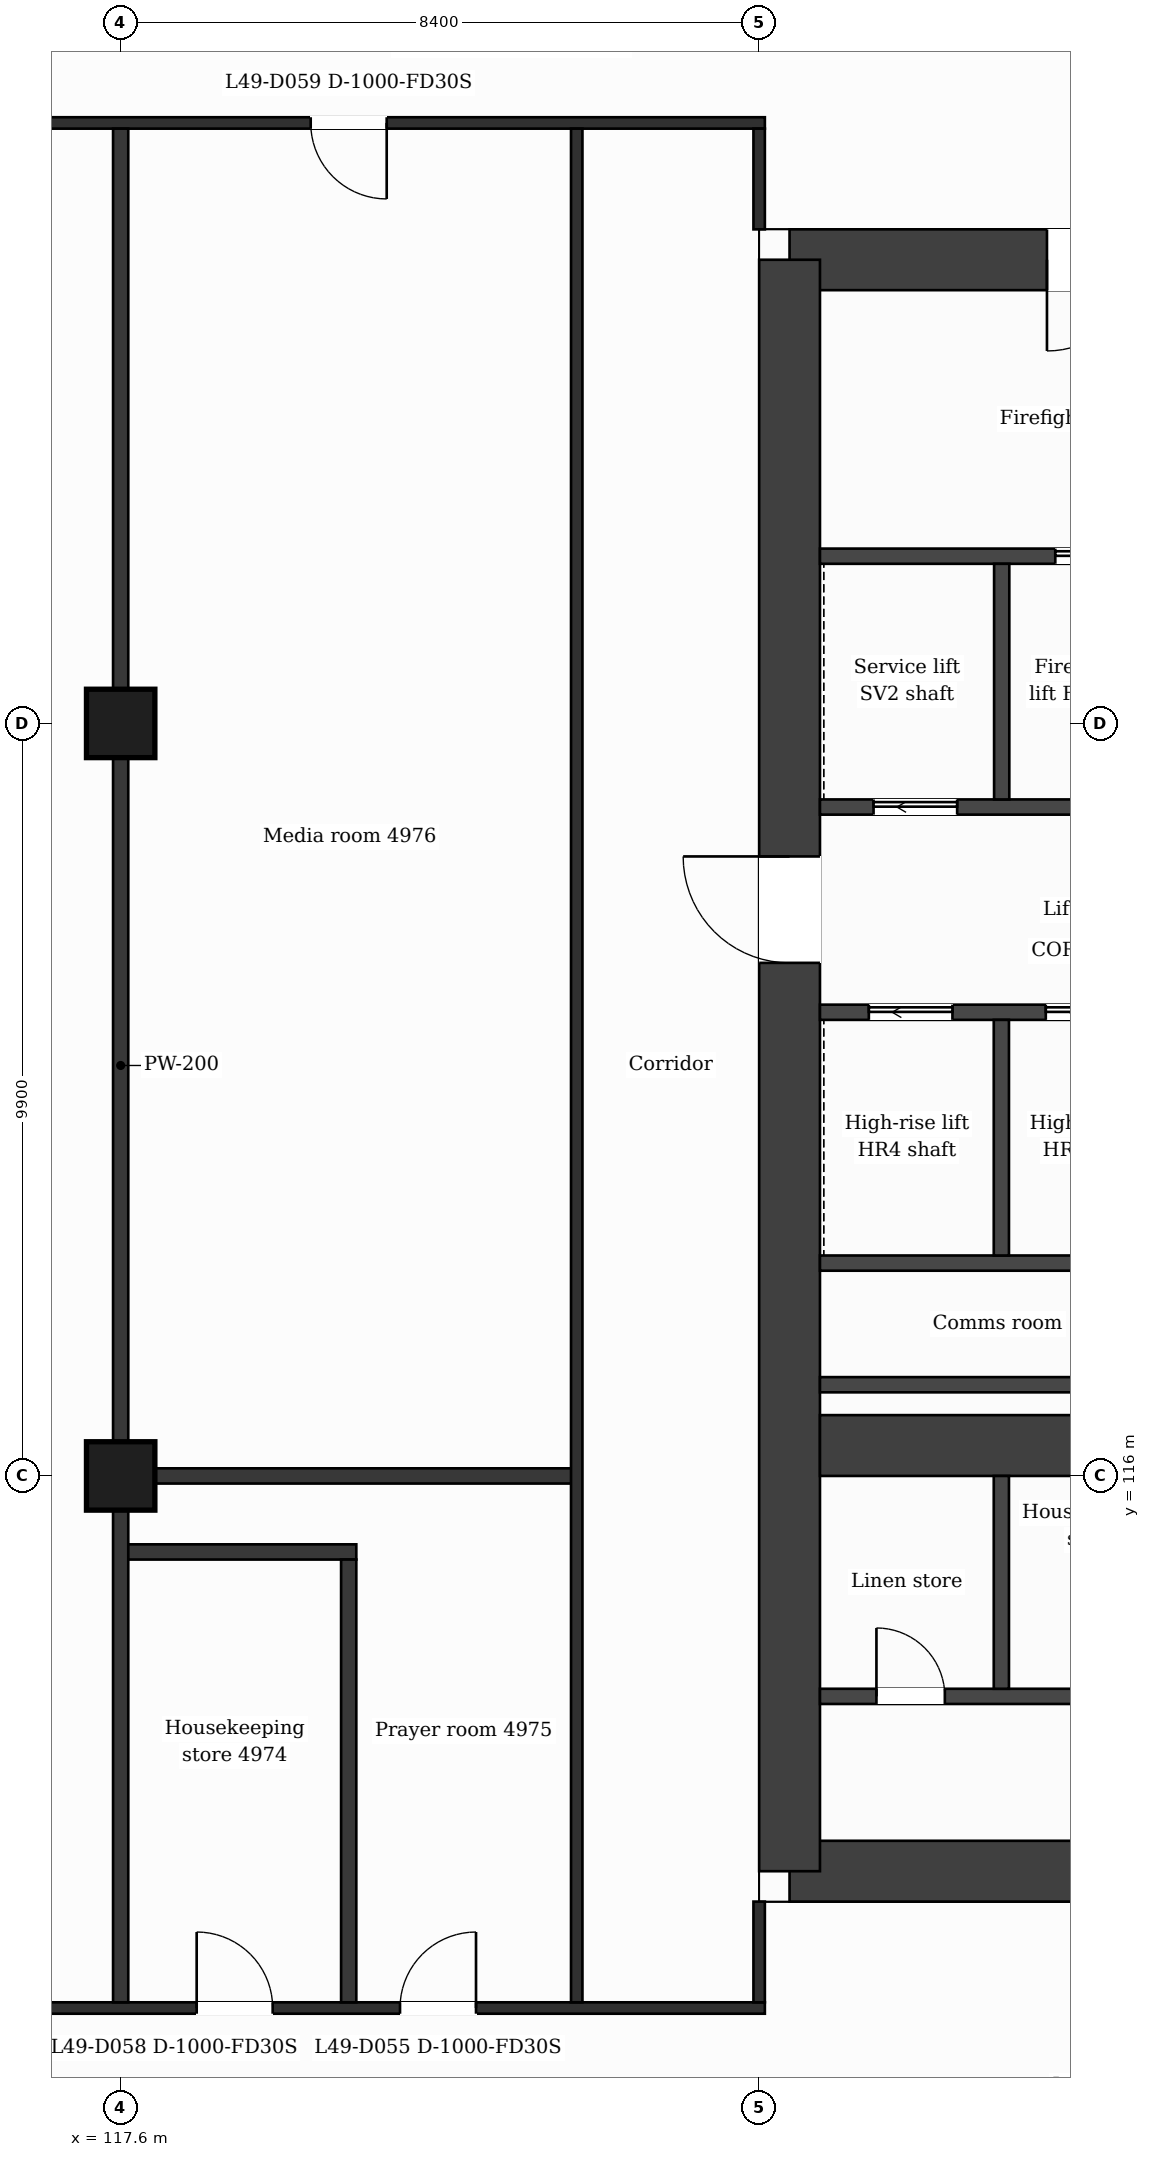
"""IFC4 building model, lengths in metres.
Left out: names, types, materials, properties, quantities, classifications, styles, units other than length and angle.
Written with IfcOpenShell. Run it as: python <this file> out.ifc"""

import sys

from ifc_helpers import new_model, si_unit, direction, frame, frame_2d, origin, origin_2d, place, context, subcontext, project, spatial, rectangle, extrude, element, fill, save


model = new_model("IFC4")
c1 = context("Model", 3, precision=1e-05, world=origin(), true_north=direction((0.0, 1.0)))
c2 = subcontext(c1, "Body", "Model", "MODEL_VIEW")
j1 = project(units=[si_unit("LENGTHUNIT", "METRE"), si_unit("PLANEANGLEUNIT", "RADIAN")], contexts=[c1])
p1 = place(None, origin())
s1 = spatial("IfcSite", under=j1, at=p1, CompositionType="ELEMENT")
p2 = place(p1, origin())
s2 = spatial("IfcBuilding", under=s1, at=p2, CompositionType="ELEMENT")
p3 = place(p2, frame((0.0, 0.0, 205.9)))
s3 = spatial("IfcBuildingStorey", under=s2, at=p3, CompositionType="ELEMENT", Elevation=205.9)
p4 = place(p3, frame((126.4, 132.0, 0.0), z_axis=(0.0, 0.0, 1.0), x_axis=(1.0, 0.0, 0.0)))
e1 = element("IfcWall", 1, at=p4, inside=s3, PredefinedType="SHEAR", context=c2, shape_type="SweptSolid", body=[
    extrude(rectangle(XDim=11.42, YDim=0.8, at=frame_2d((5.71, 0.0))), origin(), (0.0, 0.0, 1.0), 3.7),
])
p5 = place(p4, frame((3.386, 0.0, 0.0)))
e2 = element("IfcOpeningElement", 2, at=p5, cuts=e1, PredefinedType="OPENING", context=c2, shape_type="SweptSolid", body=[
    extrude(rectangle(XDim=1.2, YDim=2.1, at=frame_2d((0.6, 1.05))), frame((0.0, 0.41, 0.0), z_axis=(0.0, -1.0, 0.0), x_axis=(1.0, 0.0, 0.0)), (0.0, 0.0, 1.0), 0.82),
])
p6 = place(p3, frame((140.673, 110.8, 0.0), z_axis=(0.0, 0.0, 1.0), x_axis=(-1.0, 0.0, 0.0)))
e3 = element("IfcWall", 3, at=p6, inside=s3, PredefinedType="SHEAR", context=c2, shape_type="SweptSolid", body=[
    extrude(rectangle(XDim=14.273, YDim=0.8, at=frame_2d((7.137, 0.0))), origin(), (0.0, 0.0, 1.0), 3.7),
])
p7 = place(p6, frame((6.965, 0.0, 0.0)))
e4 = element("IfcOpeningElement", 4, at=p7, cuts=e3, PredefinedType="OPENING", context=c2, shape_type="SweptSolid", body=[
    extrude(rectangle(XDim=1.4, YDim=2.1, at=frame_2d((0.7, 1.05))), frame((0.0, 0.41, 0.0), z_axis=(0.0, -1.0, 0.0), x_axis=(1.0, 0.0, 0.0)), (0.0, 0.0, 1.0), 0.82),
])
p8 = place(p3, frame((126.4, 110.8, 0.0), z_axis=(0.0, 0.0, 1.0), x_axis=(0.0, 1.0, 0.0)))
e5 = element("IfcWall", 5, at=p8, inside=s3, PredefinedType="SHEAR", context=c2, shape_type="SweptSolid", body=[
    extrude(rectangle(XDim=21.2, YDim=0.8, at=frame_2d((10.6, 0.0))), origin(), (0.0, 0.0, 1.0), 3.7),
])
p9 = place(p8, frame((11.95, 0.0, 0.0)))
e6 = element("IfcOpeningElement", 6, at=p9, cuts=e5, PredefinedType="OPENING", context=c2, shape_type="SweptSolid", body=[
    extrude(rectangle(XDim=1.4, YDim=2.1, at=frame_2d((0.7, 1.05))), frame((0.0, 0.41, 0.0), z_axis=(0.0, -1.0, 0.0), x_axis=(1.0, 0.0, 0.0)), (0.0, 0.0, 1.0), 0.82),
])
p10 = place(p3, frame((126.8, 116.4, 0.0), z_axis=(0.0, 0.0, 1.0), x_axis=(1.0, 0.0, 0.0)))
e7 = element("IfcWall", 7, at=p10, inside=s3, PredefinedType="SHEAR", context=c2, shape_type="SweptSolid", body=[
    extrude(rectangle(XDim=5.3, YDim=0.8, at=frame_2d((2.65, 0.0))), origin(), (0.0, 0.0, 1.0), 3.7),
])
for number, where, z_axis, x_axis in (
    (8, (117.6, 116.0, 0.0), (0.0, 0.0, 1.0), (1.0, 0.0, 0.0)),
    (9, (117.6, 125.9, 0.0), (0.0, 0.0, 1.0), (1.0, 0.0, 0.0)),
):
    element("IfcColumn", number, at=place(p3, frame(where, z_axis=z_axis, x_axis=x_axis)), inside=s3, PredefinedType="COLUMN", context=c2, shape_type="SweptSolid", body=[
        extrude(rectangle(XDim=0.9, YDim=0.9, at=origin_2d()), origin(), (0.0, 0.0, 1.0), 3.7),
    ])
p11 = place(p3, frame((100.725, 109.0, 0.0), z_axis=(0.0, 0.0, 1.0), x_axis=(1.0, 0.0, 0.0)))
e10 = element("IfcWall", 10, at=p11, inside=s3, PredefinedType="PARTITIONING", context=c2, shape_type="SweptSolid", body=[
    extrude(rectangle(XDim=25.35, YDim=0.15, at=frame_2d((12.675, 0.0))), origin(), (0.0, 0.0, 1.0), 3.38),
])
p12 = place(p11, frame((20.55, 0.0, 0.0)))
e11 = element("IfcOpeningElement", 11, at=p12, cuts=e10, PredefinedType="OPENING", context=c2, shape_type="SweptSolid", body=[
    extrude(rectangle(XDim=1.0, YDim=2.1, at=frame_2d((0.5, 1.05))), frame((0.0, 0.085, 0.0), z_axis=(0.0, -1.0, 0.0), x_axis=(1.0, 0.0, 0.0)), (0.0, 0.0, 1.0), 0.17),
])
p13 = place(p11, frame((5.405, 0.0, 0.0)))
e12 = element("IfcOpeningElement", 12, at=p13, cuts=e10, PredefinedType="OPENING", context=c2, shape_type="SweptSolid", body=[
    extrude(rectangle(XDim=1.0, YDim=2.1, at=frame_2d((0.5, 1.05))), frame((0.0, 0.085, 0.0), z_axis=(0.0, -1.0, 0.0), x_axis=(1.0, 0.0, 0.0)), (0.0, 0.0, 1.0), 0.17),
])
p14 = place(p11, frame((12.175, 0.0, 0.0)))
e13 = element("IfcOpeningElement", 13, at=p14, cuts=e10, PredefinedType="OPENING", context=c2, shape_type="SweptSolid", body=[
    extrude(rectangle(XDim=1.0, YDim=2.1, at=frame_2d((0.5, 1.05))), frame((0.0, 0.085, 0.0), z_axis=(0.0, -1.0, 0.0), x_axis=(1.0, 0.0, 0.0)), (0.0, 0.0, 1.0), 0.17),
])
p15 = place(p11, frame((17.875, 0.0, 0.0)))
e14 = element("IfcOpeningElement", 14, at=p15, cuts=e10, PredefinedType="OPENING", context=c2, shape_type="SweptSolid", body=[
    extrude(rectangle(XDim=1.0, YDim=2.1, at=frame_2d((0.5, 1.05))), frame((0.0, 0.085, 0.0), z_axis=(0.0, -1.0, 0.0), x_axis=(1.0, 0.0, 0.0)), (0.0, 0.0, 1.0), 0.17),
])
p16 = place(p3, frame((126.8, 113.1, 0.0), z_axis=(0.0, 0.0, 1.0), x_axis=(1.0, 0.0, 0.0)))
e15 = element("IfcWall", 15, at=p16, inside=s3, PredefinedType="PARTITIONING", context=c2, shape_type="SweptSolid", body=[
    extrude(rectangle(XDim=4.873, YDim=0.2, at=frame_2d((2.437, 0.0))), origin(), (0.0, 0.0, 1.0), 3.38),
])
p17 = place(p16, frame((0.743, 0.0, 0.0)))
e16 = element("IfcOpeningElement", 16, at=p17, cuts=e15, PredefinedType="OPENING", context=c2, shape_type="SweptSolid", body=[
    extrude(rectangle(XDim=0.9, YDim=2.1, at=frame_2d((0.45, 1.05))), frame((0.0, 0.11, 0.0), z_axis=(0.0, -1.0, 0.0), x_axis=(1.0, 0.0, 0.0)), (0.0, 0.0, 1.0), 0.22),
])
p18 = place(p3, frame((117.6, 115.0, 0.0), z_axis=(0.0, 0.0, 1.0), x_axis=(1.0, 0.0, 0.0)))
e17 = element("IfcWall", 17, at=p18, inside=s3, PredefinedType="PARTITIONING", context=c2, shape_type="SweptSolid", body=[
    extrude(rectangle(XDim=3.1, YDim=0.2, at=frame_2d((1.55, 0.0))), origin(), (0.0, 0.0, 1.0), 3.38),
])
p19 = place(p3, frame((117.6, 116.0, 0.0), z_axis=(0.0, 0.0, 1.0), x_axis=(1.0, 0.0, 0.0)))
e18 = element("IfcWall", 18, at=p19, inside=s3, PredefinedType="PARTITIONING", context=c2, shape_type="SweptSolid", body=[
    extrude(rectangle(XDim=6.0, YDim=0.2, at=frame_2d((3.0, 0.0))), origin(), (0.0, 0.0, 1.0), 3.38),
])
for number, where, z_axis, x_axis in (
    (19, (126.8, 117.2, 0.0), (0.0, 0.0, 1.0), (1.0, 0.0, 0.0)),
    (20, (126.8, 118.8, 0.0), (0.0, 0.0, 1.0), (1.0, 0.0, 0.0)),
):
    element("IfcWall", number, at=place(p3, frame(where, z_axis=z_axis, x_axis=x_axis)), inside=s3, PredefinedType="PARTITIONING", context=c2, shape_type="SweptSolid", body=[
        extrude(rectangle(XDim=4.773, YDim=0.2, at=frame_2d((2.386, 0.0))), origin(), (0.0, 0.0, 1.0), 3.38),
    ])
p20 = place(p3, frame((126.8, 122.1, 0.0), z_axis=(0.0, 0.0, 1.0), x_axis=(1.0, 0.0, 0.0)))
e21 = element("IfcWall", 21, at=p20, inside=s3, PredefinedType="PARTITIONING", context=c2, shape_type="SweptSolid", body=[
    extrude(rectangle(XDim=4.773, YDim=0.2, at=frame_2d((2.386, 0.0))), origin(), (0.0, 0.0, 1.0), 3.38),
])
p21 = place(p20, frame((2.971, 0.0, 0.0)))
e22 = element("IfcOpeningElement", 22, at=p21, cuts=e21, PredefinedType="OPENING", context=c2, shape_type="SweptSolid", body=[
    extrude(rectangle(XDim=1.1, YDim=2.1, at=frame_2d((0.55, 1.05))), frame((0.0, 0.11, 0.0), z_axis=(0.0, -1.0, 0.0), x_axis=(1.0, 0.0, 0.0)), (0.0, 0.0, 1.0), 0.22),
])
p22 = place(p20, frame((0.643, 0.0, 0.0)))
e23 = element("IfcOpeningElement", 23, at=p22, cuts=e21, PredefinedType="OPENING", context=c2, shape_type="SweptSolid", body=[
    extrude(rectangle(XDim=1.1, YDim=2.1, at=frame_2d((0.55, 1.05))), frame((0.0, 0.11, 0.0), z_axis=(0.0, -1.0, 0.0), x_axis=(1.0, 0.0, 0.0)), (0.0, 0.0, 1.0), 0.22),
])
p23 = place(p3, frame((126.8, 124.8, 0.0), z_axis=(0.0, 0.0, 1.0), x_axis=(1.0, 0.0, 0.0)))
e24 = element("IfcWall", 24, at=p23, inside=s3, PredefinedType="PARTITIONING", context=c2, shape_type="SweptSolid", body=[
    extrude(rectangle(XDim=4.782, YDim=0.2, at=frame_2d((2.391, 0.0))), origin(), (0.0, 0.0, 1.0), 3.38),
])
p24 = place(p23, frame((0.705, 0.0, 0.0)))
e25 = element("IfcOpeningElement", 25, at=p24, cuts=e24, PredefinedType="OPENING", context=c2, shape_type="SweptSolid", body=[
    extrude(rectangle(XDim=1.1, YDim=2.1, at=frame_2d((0.55, 1.05))), frame((0.0, 0.11, 0.0), z_axis=(0.0, -1.0, 0.0), x_axis=(1.0, 0.0, 0.0)), (0.0, 0.0, 1.0), 0.22),
])
p25 = place(p3, frame((126.8, 128.1, 0.0), z_axis=(0.0, 0.0, 1.0), x_axis=(1.0, 0.0, 0.0)))
e26 = element("IfcWall", 26, at=p25, inside=s3, PredefinedType="PARTITIONING", context=c2, shape_type="SweptSolid", body=[
    extrude(rectangle(XDim=4.782, YDim=0.2, at=frame_2d((2.391, 0.0))), origin(), (0.0, 0.0, 1.0), 3.38),
])
p26 = place(p25, frame((3.096, 0.0, 0.0)))
e27 = element("IfcOpeningElement", 27, at=p26, cuts=e26, PredefinedType="OPENING", context=c2, shape_type="SweptSolid", body=[
    extrude(rectangle(XDim=1.1, YDim=2.1, at=frame_2d((0.55, 1.05))), frame((0.0, 0.11, 0.0), z_axis=(0.0, -1.0, 0.0), x_axis=(1.0, 0.0, 0.0)), (0.0, 0.0, 1.0), 0.22),
])
p27 = place(p3, frame((100.725, 133.8, 0.0), z_axis=(0.0, 0.0, 1.0), x_axis=(1.0, 0.0, 0.0)))
e28 = element("IfcWall", 28, at=p27, inside=s3, PredefinedType="PARTITIONING", context=c2, shape_type="SweptSolid", body=[
    extrude(rectangle(XDim=25.35, YDim=0.15, at=frame_2d((12.675, 0.0))), origin(), (0.0, 0.0, 1.0), 3.38),
])
p28 = place(p27, frame((19.375, 0.0, 0.0)))
e29 = element("IfcOpeningElement", 29, at=p28, cuts=e28, PredefinedType="OPENING", context=c2, shape_type="SweptSolid", body=[
    extrude(rectangle(XDim=1.0, YDim=2.1, at=frame_2d((0.5, 1.05))), frame((0.0, 0.085, 0.0), z_axis=(0.0, -1.0, 0.0), x_axis=(1.0, 0.0, 0.0)), (0.0, 0.0, 1.0), 0.17),
])
p29 = place(p3, frame((117.6, 109.075, 0.0), z_axis=(0.0, 0.0, 1.0), x_axis=(0.0, 1.0, 0.0)))
e30 = element("IfcWall", 30, at=p29, inside=s3, PredefinedType="PARTITIONING", context=c2, shape_type="SweptSolid", body=[
    extrude(rectangle(XDim=24.65, YDim=0.2, at=frame_2d((12.325, 0.0))), origin(), (0.0, 0.0, 1.0), 3.38),
])
p30 = place(p3, frame((120.6, 109.075, 0.0), z_axis=(0.0, 0.0, 1.0), x_axis=(0.0, 1.0, 0.0)))
e31 = element("IfcWall", 31, at=p30, inside=s3, PredefinedType="PARTITIONING", context=c2, shape_type="SweptSolid", body=[
    extrude(rectangle(XDim=5.825, YDim=0.2, at=frame_2d((2.913, 0.0))), origin(), (0.0, 0.0, 1.0), 3.38),
])
p31 = place(p3, frame((123.6, 109.075, 0.0), z_axis=(0.0, 0.0, 1.0), x_axis=(0.0, 1.0, 0.0)))
e32 = element("IfcWall", 32, at=p31, inside=s3, PredefinedType="PARTITIONING", context=c2, shape_type="SweptSolid", body=[
    extrude(rectangle(XDim=24.65, YDim=0.15, at=frame_2d((12.325, 0.0))), origin(), (0.0, 0.0, 1.0), 3.38),
])
p32 = place(p3, frame((126.0, 109.075, 0.0), z_axis=(0.0, 0.0, 1.0), x_axis=(0.0, 1.0, 0.0)))
e33 = element("IfcWall", 33, at=p32, inside=s3, PredefinedType="PARTITIONING", context=c2, shape_type="SweptSolid", body=[
    extrude(rectangle(XDim=1.325, YDim=0.15, at=frame_2d((0.663, 0.0))), origin(), (0.0, 0.0, 1.0), 3.38),
])
p33 = place(p3, frame((126.0, 132.4, 0.0), z_axis=(0.0, 0.0, 1.0), x_axis=(0.0, 1.0, 0.0)))
e34 = element("IfcWall", 34, at=p33, inside=s3, PredefinedType="PARTITIONING", context=c2, shape_type="SweptSolid", body=[
    extrude(rectangle(XDim=1.325, YDim=0.15, at=frame_2d((0.663, 0.0))), origin(), (0.0, 0.0, 1.0), 3.38),
])
p34 = place(p3, frame((129.187, 113.2, 0.0), z_axis=(0.0, 0.0, 1.0), x_axis=(0.0, 1.0, 0.0)))
e35 = element("IfcWall", 35, at=p34, inside=s3, PredefinedType="PARTITIONING", context=c2, shape_type="SweptSolid", body=[
    extrude(rectangle(XDim=2.8, YDim=0.2, at=frame_2d((1.4, 0.0))), origin(), (0.0, 0.0, 1.0), 3.38),
])
for number, where, z_axis, x_axis in (
    (36, (129.187, 118.9, 0.0), (0.0, 0.0, 1.0), (0.0, 1.0, 0.0)),
    (37, (129.191, 124.9, 0.0), (0.0, 0.0, 1.0), (0.0, 1.0, 0.0)),
):
    element("IfcWall", number, at=place(p3, frame(where, z_axis=z_axis, x_axis=x_axis)), inside=s3, PredefinedType="PARTITIONING", context=c2, shape_type="SweptSolid", body=[
        extrude(rectangle(XDim=3.1, YDim=0.2, at=frame_2d((1.55, 0.0))), origin(), (0.0, 0.0, 1.0), 3.38),
    ])
p35 = place(p21, origin())
e38 = element("IfcDoor", 38, at=p35, inside=s3, OperationType="SLIDING_TO_LEFT", PredefinedType="DOOR", context=c2, shape_type="SweptSolid", body=[
    extrude(rectangle(XDim=1.1, YDim=2.1, at=frame_2d((0.55, 1.05))), frame((0.0, 0.025, 0.0), z_axis=(0.0, -1.0, 0.0), x_axis=(1.0, 0.0, 0.0)), (0.0, 0.0, 1.0), 0.05),
])
fill(e22, e38)
p36 = place(p22, origin())
e39 = element("IfcDoor", 39, at=p36, inside=s3, OperationType="SLIDING_TO_LEFT", PredefinedType="DOOR", context=c2, shape_type="SweptSolid", body=[
    extrude(rectangle(XDim=1.1, YDim=2.1, at=frame_2d((0.55, 1.05))), frame((0.0, 0.025, 0.0), z_axis=(0.0, -1.0, 0.0), x_axis=(1.0, 0.0, 0.0)), (0.0, 0.0, 1.0), 0.05),
])
fill(e23, e39)
p37 = place(p26, origin())
e40 = element("IfcDoor", 40, at=p37, inside=s3, OperationType="SLIDING_TO_LEFT", PredefinedType="DOOR", context=c2, shape_type="SweptSolid", body=[
    extrude(rectangle(XDim=1.1, YDim=2.1, at=frame_2d((0.55, 1.05))), frame((0.0, 0.025, 0.0), z_axis=(0.0, -1.0, 0.0), x_axis=(1.0, 0.0, 0.0)), (0.0, 0.0, 1.0), 0.05),
])
fill(e27, e40)
p38 = place(p24, origin())
e41 = element("IfcDoor", 41, at=p38, inside=s3, OperationType="SLIDING_TO_LEFT", PredefinedType="DOOR", context=c2, shape_type="SweptSolid", body=[
    extrude(rectangle(XDim=1.1, YDim=2.1, at=frame_2d((0.55, 1.05))), frame((0.0, 0.025, 0.0), z_axis=(0.0, -1.0, 0.0), x_axis=(1.0, 0.0, 0.0)), (0.0, 0.0, 1.0), 0.05),
])
fill(e25, e41)
p39 = place(p17, origin())
e42 = element("IfcDoor", 42, at=p39, inside=s3, OperationType="SINGLE_SWING_LEFT", PredefinedType="DOOR", context=c2, shape_type="SweptSolid", body=[
    extrude(rectangle(XDim=0.9, YDim=2.1, at=frame_2d((0.45, 1.05))), frame((0.0, 0.025, 0.0), z_axis=(0.0, -1.0, 0.0), x_axis=(1.0, 0.0, 0.0)), (0.0, 0.0, 1.0), 0.05),
])
fill(e16, e42)
p40 = place(p12, origin())
e43 = element("IfcDoor", 43, at=p40, inside=s3, OperationType="SINGLE_SWING_RIGHT", PredefinedType="DOOR", context=c2, shape_type="SweptSolid", body=[
    extrude(rectangle(XDim=1.0, YDim=2.1, at=frame_2d((0.5, 1.05))), frame((0.0, 0.025, 0.0), z_axis=(0.0, -1.0, 0.0), x_axis=(1.0, 0.0, 0.0)), (0.0, 0.0, 1.0), 0.05),
])
fill(e11, e43)
p41 = place(p15, origin())
e44 = element("IfcDoor", 44, at=p41, inside=s3, OperationType="SINGLE_SWING_LEFT", PredefinedType="DOOR", context=c2, shape_type="SweptSolid", body=[
    extrude(rectangle(XDim=1.0, YDim=2.1, at=frame_2d((0.5, 1.05))), frame((0.0, 0.025, 0.0), z_axis=(0.0, -1.0, 0.0), x_axis=(1.0, 0.0, 0.0)), (0.0, 0.0, 1.0), 0.05),
])
fill(e14, e44)
p42 = place(p28, origin())
e45 = element("IfcDoor", 45, at=p42, inside=s3, OperationType="SINGLE_SWING_RIGHT", PredefinedType="DOOR", context=c2, shape_type="SweptSolid", body=[
    extrude(rectangle(XDim=1.0, YDim=2.1, at=frame_2d((0.5, 1.05))), frame((0.0, 0.025, 0.0), z_axis=(0.0, -1.0, 0.0), x_axis=(1.0, 0.0, 0.0)), (0.0, 0.0, 1.0), 0.05),
])
fill(e29, e45)
p43 = place(p5, origin())
e46 = element("IfcDoor", 46, at=p43, inside=s3, OperationType="SINGLE_SWING_LEFT", PredefinedType="DOOR", context=c2, shape_type="SweptSolid", body=[
    extrude(rectangle(XDim=1.2, YDim=2.1, at=frame_2d((0.6, 1.05))), frame((0.0, 0.025, 0.0), z_axis=(0.0, -1.0, 0.0), x_axis=(1.0, 0.0, 0.0)), (0.0, 0.0, 1.0), 0.05),
])
fill(e2, e46)
p44 = place(p9, origin())
e47 = element("IfcDoor", 47, at=p44, inside=s3, OperationType="SINGLE_SWING_RIGHT", PredefinedType="DOOR", context=c2, shape_type="SweptSolid", body=[
    extrude(rectangle(XDim=1.4, YDim=2.1, at=frame_2d((0.7, 1.05))), frame((0.0, 0.025, 0.0), z_axis=(0.0, -1.0, 0.0), x_axis=(1.0, 0.0, 0.0)), (0.0, 0.0, 1.0), 0.05),
])
fill(e6, e47)
save(model, sys.argv[1])
